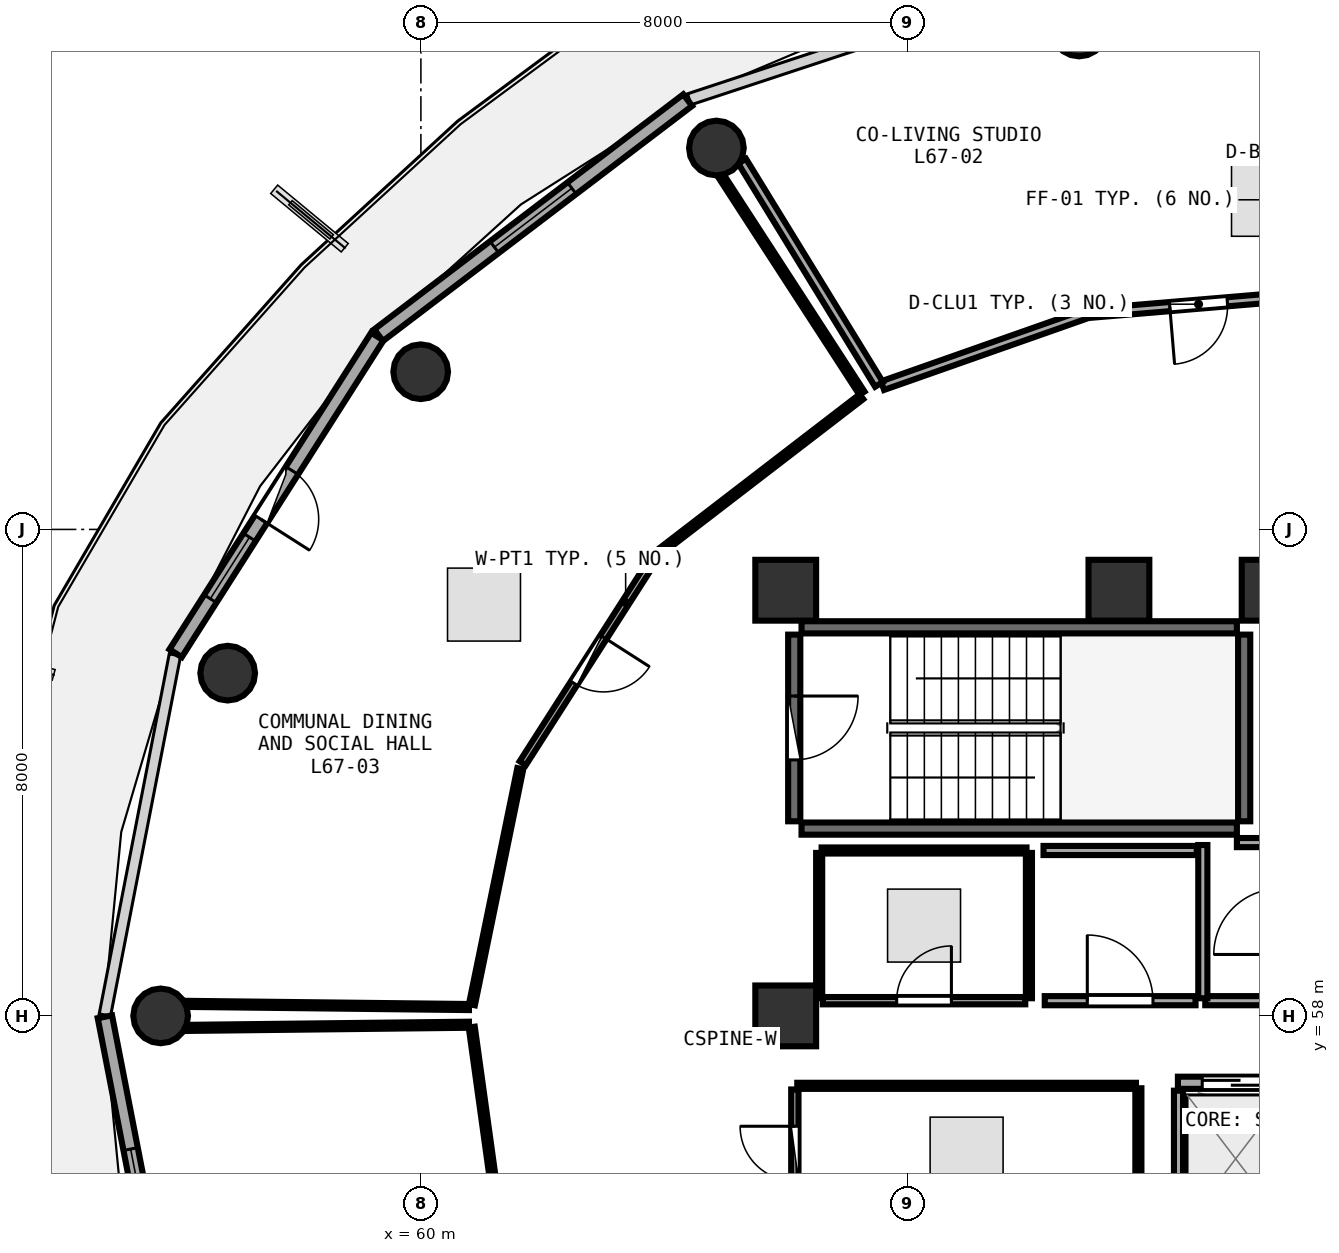
"""IFC4 building model, lengths in metres.
Left out: names, types, materials, properties, quantities, classifications, styles, units other than length and angle.
Written with IfcOpenShell. Run it as: python <this file> out.ifc"""

import sys

from ifc_helpers import new_model, si_unit, direction, frame, frame_2d, origin, origin_2d, place, context, subcontext, project, spatial, rectangle, circle, extrude, element, fill, save


model = new_model("IFC4")
c1 = context("Model", 3, precision=1e-05, world=origin(), true_north=direction((0.0, 1.0)))
c2 = subcontext(c1, "Body", "Model", "MODEL_VIEW")
j1 = project(units=[si_unit("LENGTHUNIT", "METRE"), si_unit("PLANEANGLEUNIT", "RADIAN")], contexts=[c1])
p1 = place(None, origin())
s1 = spatial("IfcSite", under=j1, at=p1, CompositionType="ELEMENT")
p2 = place(p1, origin())
s2 = spatial("IfcBuilding", under=s1, at=p2, CompositionType="ELEMENT")
p3 = place(p2, frame((0.0, 0.0, 263.7)))
s3 = spatial("IfcBuildingStorey", under=s2, at=p3, CompositionType="ELEMENT", Elevation=263.7)
for number, where, z_axis, x_axis in (
    (1, (74.0, 65.0, 0.0), (0.0, 0.0, 1.0), (1.0, 0.0, 0.0)),
    (2, (71.48, 65.0, 0.0), (0.0, 0.0, 1.0), (1.0, 0.0, 0.0)),
    (3, (66.0, 65.0, 0.0), (0.0, 0.0, 1.0), (1.0, 0.0, 0.0)),
    (4, (66.0, 58.0, 0.0), (0.0, 0.0, 1.0), (1.0, 0.0, 0.0)),
):
    element("IfcColumn", number, at=place(p3, frame(where, z_axis=z_axis, x_axis=x_axis)), inside=s3, PredefinedType="PILASTER", context=c2, shape_type="SweptSolid", body=[
        extrude(rectangle(XDim=1.0, YDim=1.0, at=origin_2d()), origin(), (0.0, 0.0, 1.0), 3.75),
    ])
for number, where, z_axis, x_axis in (
    (5, (70.826, 74.229, 0.0), (0.0, 0.0, 1.0), (1.0, 0.0, 0.0)),
    (6, (64.86, 72.272, 0.0), (0.0, 0.0, 1.0), (1.0, 0.0, 0.0)),
    (7, (59.997, 68.593, 0.0), (0.0, 0.0, 1.0), (1.0, 0.0, 0.0)),
    (8, (56.823, 63.636, 0.0), (0.0, 0.0, 1.0), (1.0, 0.0, 0.0)),
    (9, (55.72, 58.0, 0.0), (0.0, 0.0, 1.0), (1.0, 0.0, 0.0)),
):
    element("IfcColumn", number, at=place(p3, frame(where, z_axis=z_axis, x_axis=x_axis)), inside=s3, PredefinedType="COLUMN", context=c2, shape_type="SweptSolid", body=[
        extrude(circle(Radius=0.45, at=origin_2d()), origin(), (0.0, 0.0, 1.0), 3.75),
    ])
p4 = place(p3, frame((64.388, 73.06, 0.0), z_axis=(0.0, 0.0, 1.0), x_axis=(-0.796010444211, -0.605282886514, 0.0)))
e10 = element("IfcWall", 10, at=p4, inside=s3, PredefinedType="SOLIDWALL", context=c2, shape_type="SweptSolid", body=[
    extrude(rectangle(XDim=6.387, YDim=0.24, at=frame_2d((3.194, 0.0))), origin(), (0.0, 0.0, 1.0), 3.475),
])
p5 = place(p4, frame((2.394, 0.0, 0.85)))
e11 = element("IfcOpeningElement", 11, at=p5, cuts=e10, PredefinedType="OPENING", context=c2, shape_type="SweptSolid", body=[
    extrude(rectangle(XDim=1.6, YDim=1.45, at=frame_2d((0.8, 0.725))), frame((0.0, 0.13, 0.0), z_axis=(0.0, -1.0, 0.0), x_axis=(1.0, 0.0, 0.0)), (0.0, 0.0, 1.0), 0.26),
])
p6 = place(p3, frame((59.284, 69.172, 0.0), z_axis=(0.0, 0.0, 1.0), x_axis=(-0.537271968456, -0.843409053728, 0.0)))
e12 = element("IfcWall", 12, at=p6, inside=s3, PredefinedType="SOLIDWALL", context=c2, shape_type="SweptSolid", body=[
    extrude(rectangle(XDim=6.175, YDim=0.24, at=frame_2d((3.087, 0.0))), origin(), (0.0, 0.0, 1.0), 3.475),
])
p7 = place(p6, frame((2.613, 0.0, 0.0)))
e13 = element("IfcOpeningElement", 13, at=p7, cuts=e12, PredefinedType="OPENING", context=c2, shape_type="SweptSolid", body=[
    extrude(rectangle(XDim=0.95, YDim=2.1, at=frame_2d((0.475, 1.05))), frame((0.0, 0.13, 0.0), z_axis=(0.0, -1.0, 0.0), x_axis=(1.0, 0.0, 0.0)), (0.0, 0.0, 1.0), 0.26),
])
p8 = place(p6, frame((3.913, 0.0, 0.85)))
e14 = element("IfcOpeningElement", 14, at=p8, cuts=e12, PredefinedType="OPENING", context=c2, shape_type="SweptSolid", body=[
    extrude(rectangle(XDim=1.2, YDim=1.45, at=frame_2d((0.6, 0.725))), frame((0.0, 0.13, 0.0), z_axis=(0.0, -1.0, 0.0), x_axis=(1.0, 0.0, 0.0)), (0.0, 0.0, 1.0), 0.26),
])
p9 = place(p3, frame((54.803, 57.985, 0.0), z_axis=(0.0, 0.0, 1.0), x_axis=(0.190969309115, -0.981596008028, 0.0)))
e15 = element("IfcWall", 15, at=p9, inside=s3, PredefinedType="SOLIDWALL", context=c2, shape_type="SweptSolid", body=[
    extrude(rectangle(XDim=6.033, YDim=0.24, at=frame_2d((3.017, 0.0))), origin(), (0.0, 0.0, 1.0), 3.475),
])
p10 = place(p9, frame((2.216, 0.0, 0.85)))
e16 = element("IfcOpeningElement", 16, at=p10, cuts=e15, PredefinedType="OPENING", context=c2, shape_type="SweptSolid", body=[
    extrude(rectangle(XDim=1.6, YDim=1.45, at=frame_2d((0.8, 0.725))), frame((0.0, 0.13, 0.0), z_axis=(0.0, -1.0, 0.0), x_axis=(1.0, 0.0, 0.0)), (0.0, 0.0, 1.0), 0.26),
])
p11 = place(p3, frame((66.26, 61.08, 0.0), z_axis=(0.0, 0.0, 1.0), x_axis=(1.0, 0.0, 0.0)))
e17 = element("IfcWall", 17, at=p11, inside=s3, PredefinedType="SHEAR", context=c2, shape_type="SweptSolid", body=[
    extrude(rectangle(XDim=7.16, YDim=0.2, at=frame_2d((3.58, 0.0))), origin(), (0.0, 0.0, 1.0), 3.49),
])
p12 = place(p3, frame((73.54, 61.2, 0.0), z_axis=(0.0, 0.0, 1.0), x_axis=(0.0, 1.0, 0.0)))
e18 = element("IfcWall", 18, at=p12, inside=s3, PredefinedType="SHEAR", context=c2, shape_type="SweptSolid", body=[
    extrude(rectangle(XDim=3.07, YDim=0.2, at=frame_2d((1.535, 0.0))), origin(), (0.0, 0.0, 1.0), 3.49),
])
p13 = place(p3, frame((73.42, 64.39, 0.0), z_axis=(0.0, 0.0, 1.0), x_axis=(-1.0, 0.0, 0.0)))
e19 = element("IfcWall", 19, at=p13, inside=s3, PredefinedType="SHEAR", context=c2, shape_type="SweptSolid", body=[
    extrude(rectangle(XDim=7.16, YDim=0.2, at=frame_2d((3.58, 0.0))), origin(), (0.0, 0.0, 1.0), 3.49),
])
p14 = place(p3, frame((66.14, 64.27, 0.0), z_axis=(0.0, 0.0, 1.0), x_axis=(0.0, -1.0, 0.0)))
e20 = element("IfcWall", 20, at=p14, inside=s3, PredefinedType="SHEAR", context=c2, shape_type="SweptSolid", body=[
    extrude(rectangle(XDim=3.07, YDim=0.2, at=frame_2d((1.535, 0.0))), origin(), (0.0, 0.0, 1.0), 3.49),
])
p15 = place(p14, frame((1.01, 0.0, 0.0)))
e21 = element("IfcOpeningElement", 21, at=p15, cuts=e20, PredefinedType="OPENING", context=c2, shape_type="SweptSolid", body=[
    extrude(rectangle(XDim=1.05, YDim=2.1, at=frame_2d((0.525, 1.05))), frame((0.0, 0.11, 0.0), z_axis=(0.0, -1.0, 0.0), x_axis=(1.0, 0.0, 0.0)), (0.0, 0.0, 1.0), 0.22),
])
p16 = place(p3, frame((72.45, 56.9, 0.0), z_axis=(0.0, 0.0, 1.0), x_axis=(1.0, 0.0, 0.0)))
e22 = element("IfcWall", 22, at=p16, inside=s3, PredefinedType="SOLIDWALL", context=c2, shape_type="SweptSolid", body=[
    extrude(rectangle(XDim=8.4, YDim=0.2, at=frame_2d((4.2, 0.0))), origin(), (0.0, 0.0, 1.0), 3.48),
])
p17 = place(p16, frame((0.4, 0.0, 0.0)))
e23 = element("IfcOpeningElement", 23, at=p17, cuts=e22, PredefinedType="OPENING", context=c2, shape_type="SweptSolid", body=[
    extrude(rectangle(XDim=1.1, YDim=2.1, at=frame_2d((0.55, 1.05))), frame((0.0, 0.11, 0.0), z_axis=(0.0, -1.0, 0.0), x_axis=(1.0, 0.0, 0.0)), (0.0, 0.0, 1.0), 0.22),
])
p18 = place(p16, frame((2.4, 0.0, 0.0)))
e24 = element("IfcOpeningElement", 24, at=p18, cuts=e22, PredefinedType="OPENING", context=c2, shape_type="SweptSolid", body=[
    extrude(rectangle(XDim=1.1, YDim=2.1, at=frame_2d((0.55, 1.05))), frame((0.0, 0.11, 0.0), z_axis=(0.0, -1.0, 0.0), x_axis=(1.0, 0.0, 0.0)), (0.0, 0.0, 1.0), 0.22),
])
p19 = place(p3, frame((72.46, 54.48, 0.0), z_axis=(0.0, 0.0, 1.0), x_axis=(0.0, 1.0, 0.0)))
e25 = element("IfcWall", 25, at=p19, inside=s3, PredefinedType="PARTITIONING", context=c2, shape_type="SweptSolid", body=[
    extrude(rectangle(XDim=2.29, YDim=0.15, at=frame_2d((1.145, 0.0))), origin(), (0.0, 0.0, 1.0), 3.48),
])
p20 = place(p3, frame((66.61, 58.25, 0.0), z_axis=(0.0, 0.0, 1.0), x_axis=(1.0, 0.0, 0.0)))
e26 = element("IfcWall", 26, at=p20, inside=s3, PredefinedType="PARTITIONING", context=c2, shape_type="SweptSolid", body=[
    extrude(rectangle(XDim=3.33, YDim=0.12, at=frame_2d((1.665, 0.0))), origin(), (0.0, 0.0, 1.0), 3.48),
])
p21 = place(p20, frame((1.215, 0.0, 0.0)))
e27 = element("IfcOpeningElement", 27, at=p21, cuts=e26, PredefinedType="OPENING", context=c2, shape_type="SweptSolid", body=[
    extrude(rectangle(XDim=0.9, YDim=2.08, at=frame_2d((0.45, 1.04))), frame((0.0, 0.07, 0.0), z_axis=(0.0, -1.0, 0.0), x_axis=(1.0, 0.0, 0.0)), (0.0, 0.0, 1.0), 0.14),
])
p22 = place(p3, frame((70.26, 58.25, 0.0), z_axis=(0.0, 0.0, 1.0), x_axis=(1.0, 0.0, 0.0)))
e28 = element("IfcWall", 28, at=p22, inside=s3, PredefinedType="PARTITIONING", context=c2, shape_type="SweptSolid", body=[
    extrude(rectangle(XDim=2.48, YDim=0.15, at=frame_2d((1.24, 0.0))), origin(), (0.0, 0.0, 1.0), 3.48),
])
p23 = place(p22, frame((0.7, 0.0, 0.0)))
e29 = element("IfcOpeningElement", 29, at=p23, cuts=e28, PredefinedType="OPENING", context=c2, shape_type="SweptSolid", body=[
    extrude(rectangle(XDim=1.08, YDim=2.1, at=frame_2d((0.54, 1.05))), frame((0.0, 0.085, 0.0), z_axis=(0.0, -1.0, 0.0), x_axis=(1.0, 0.0, 0.0)), (0.0, 0.0, 1.0), 0.17),
])
p24 = place(p3, frame((66.15, 54.68, 0.0), z_axis=(0.0, 0.0, 1.0), x_axis=(0.0, 1.0, 0.0)))
e30 = element("IfcWall", 30, at=p24, inside=s3, PredefinedType="PARTITIONING", context=c2, shape_type="SweptSolid", body=[
    extrude(rectangle(XDim=2.11, YDim=0.12, at=frame_2d((1.055, 0.0))), origin(), (0.0, 0.0, 1.0), 2.775),
])
p25 = place(p24, frame((0.605, 0.0, 0.0)))
e31 = element("IfcOpeningElement", 31, at=p25, cuts=e30, PredefinedType="OPENING", context=c2, shape_type="SweptSolid", body=[
    extrude(rectangle(XDim=0.9, YDim=2.08, at=frame_2d((0.45, 1.04))), frame((0.0, 0.07, 0.0), z_axis=(0.0, -1.0, 0.0), x_axis=(1.0, 0.0, 0.0)), (0.0, 0.0, 1.0), 0.14),
])
p26 = place(p3, frame((74.553, 69.852, 0.0), z_axis=(0.0, 0.0, 1.0), x_axis=(-0.996494196011, -0.083661922741, 0.0)))
e32 = element("IfcWall", 32, at=p26, inside=s3, PredefinedType="PARTITIONING", context=c2, shape_type="SweptSolid", body=[
    extrude(rectangle(XDim=3.54, YDim=0.15, at=frame_2d((1.77, 0.0))), origin(), (0.0, 0.0, 1.0), 3.075),
])
p27 = place(p26, frame((1.295, 0.0, 0.0)))
e33 = element("IfcOpeningElement", 33, at=p27, cuts=e32, PredefinedType="OPENING", context=c2, shape_type="SweptSolid", body=[
    extrude(rectangle(XDim=0.95, YDim=2.08, at=frame_2d((0.475, 1.04))), frame((0.0, 0.085, 0.0), z_axis=(0.0, -1.0, 0.0), x_axis=(1.0, 0.0, 0.0)), (0.0, 0.0, 1.0), 0.17),
])
p28 = place(p3, frame((63.844, 65.542, 0.0), z_axis=(0.0, 0.0, 1.0), x_axis=(-0.539324099435, -0.842098281538, 0.0)))
e34 = element("IfcWall", 34, at=p28, inside=s3, PredefinedType="PARTITIONING", context=c2, shape_type="SweptSolid", body=[
    extrude(rectangle(XDim=4.022, YDim=0.12, at=frame_2d((2.011, 0.0))), origin(), (0.0, 0.0, 1.0), 3.075),
])
p29 = place(p28, frame((1.561, 0.0, 0.0)))
e35 = element("IfcOpeningElement", 35, at=p29, cuts=e34, PredefinedType="OPENING", context=c2, shape_type="SweptSolid", body=[
    extrude(rectangle(XDim=0.9, YDim=2.08, at=frame_2d((0.45, 1.04))), frame((0.0, 0.07, 0.0), z_axis=(0.0, -1.0, 0.0), x_axis=(1.0, 0.0, 0.0)), (0.0, 0.0, 1.0), 0.14),
])
p30 = place(p3, frame((72.9, 58.25, 0.0), z_axis=(0.0, 0.0, 1.0), x_axis=(1.0, 0.0, 0.0)))
e36 = element("IfcWall", 36, at=p30, inside=s3, PredefinedType="PARTITIONING", context=c2, shape_type="SweptSolid", body=[
    extrude(rectangle(XDim=1.18, YDim=0.15, at=frame_2d((0.59, 0.0))), origin(), (0.0, 0.0, 1.0), 3.48),
])
p31 = place(p3, frame((74.08, 60.85, 0.0), z_axis=(0.0, 0.0, 1.0), x_axis=(-1.0, 0.0, 0.0)))
e37 = element("IfcWall", 37, at=p31, inside=s3, PredefinedType="PARTITIONING", context=c2, shape_type="SweptSolid", body=[
    extrude(rectangle(XDim=0.66, YDim=0.15, at=frame_2d((0.33, 0.0))), origin(), (0.0, 0.0, 1.0), 3.48),
])
p32 = place(p3, frame((72.86, 60.81, 0.0), z_axis=(0.0, 0.0, 1.0), x_axis=(0.0, -1.0, 0.0)))
e38 = element("IfcWall", 38, at=p32, inside=s3, PredefinedType="PARTITIONING", context=c2, shape_type="SweptSolid", body=[
    extrude(rectangle(XDim=2.52, YDim=0.15, at=frame_2d((1.26, 0.0))), origin(), (0.0, 0.0, 1.0), 3.48),
])
p33 = place(p3, frame((70.0, 58.29, 0.0), z_axis=(0.0, 0.0, 1.0), x_axis=(0.0, 1.0, 0.0)))
e39 = element("IfcWall", 39, at=p33, inside=s3, PredefinedType="PARTITIONING", context=c2, shape_type="SweptSolid", body=[
    extrude(rectangle(XDim=2.39, YDim=0.1, at=frame_2d((1.195, 0.0))), origin(), (0.0, 0.0, 1.0), 3.48),
])
p34 = place(p3, frame((69.96, 60.72, 0.0), z_axis=(0.0, 0.0, 1.0), x_axis=(-1.0, 0.0, 0.0)))
e40 = element("IfcWall", 40, at=p34, inside=s3, PredefinedType="PARTITIONING", context=c2, shape_type="SweptSolid", body=[
    extrude(rectangle(XDim=3.37, YDim=0.1, at=frame_2d((1.685, 0.0))), origin(), (0.0, 0.0, 1.0), 3.48),
])
p35 = place(p3, frame((66.55, 60.68, 0.0), z_axis=(0.0, 0.0, 1.0), x_axis=(0.0, -1.0, 0.0)))
e41 = element("IfcWall", 41, at=p35, inside=s3, PredefinedType="PARTITIONING", context=c2, shape_type="SweptSolid", body=[
    extrude(rectangle(XDim=2.39, YDim=0.1, at=frame_2d((1.195, 0.0))), origin(), (0.0, 0.0, 1.0), 3.48),
])
p36 = place(p3, frame((72.76, 60.72, 0.0), z_axis=(0.0, 0.0, 1.0), x_axis=(-1.0, 0.0, 0.0)))
e42 = element("IfcWall", 42, at=p36, inside=s3, PredefinedType="PARTITIONING", context=c2, shape_type="SweptSolid", body=[
    extrude(rectangle(XDim=2.52, YDim=0.15, at=frame_2d((1.26, 0.0))), origin(), (0.0, 0.0, 1.0), 3.48),
])
p37 = place(p3, frame((71.8, 54.66, 0.0), z_axis=(0.0, 0.0, 1.0), x_axis=(0.0, 1.0, 0.0)))
e43 = element("IfcWall", 43, at=p37, inside=s3, PredefinedType="PARTITIONING", context=c2, shape_type="SweptSolid", body=[
    extrude(rectangle(XDim=2.15, YDim=0.1, at=frame_2d((1.075, 0.0))), origin(), (0.0, 0.0, 1.0), 3.48),
])
p38 = place(p3, frame((71.76, 56.85, 0.0), z_axis=(0.0, 0.0, 1.0), x_axis=(-1.0, 0.0, 0.0)))
e44 = element("IfcWall", 44, at=p38, inside=s3, PredefinedType="PARTITIONING", context=c2, shape_type="SweptSolid", body=[
    extrude(rectangle(XDim=5.57, YDim=0.1, at=frame_2d((2.785, 0.0))), origin(), (0.0, 0.0, 1.0), 2.775),
])
p39 = place(p3, frame((70.928, 69.538, 0.0), z_axis=(0.0, 0.0, 1.0), x_axis=(-0.943334007166, -0.331844769319, 0.0)))
e45 = element("IfcWall", 45, at=p39, inside=s3, PredefinedType="PARTITIONING", context=c2, shape_type="SweptSolid", body=[
    extrude(rectangle(XDim=3.536, YDim=0.15, at=frame_2d((1.768, 0.0))), origin(), (0.0, 0.0, 1.0), 3.48),
])
p40 = place(p3, frame((67.534, 68.385, 0.0), z_axis=(0.0, 0.0, 1.0), x_axis=(-0.522784059663, 0.852465147066, 0.0)))
e46 = element("IfcWall", 46, at=p40, inside=s3, PredefinedType="PARTITIONING", context=c2, shape_type="SweptSolid", body=[
    extrude(rectangle(XDim=4.306, YDim=0.15, at=frame_2d((2.153, 0.0))), origin(), (0.0, 0.0, 1.0), 3.175),
])
p41 = place(p3, frame((67.244, 68.182, 0.0), z_axis=(0.0, 0.0, 1.0), x_axis=(-0.792820246885, -0.609455540733, 0.0)))
e47 = element("IfcWall", 47, at=p41, inside=s3, PredefinedType="PARTITIONING", context=c2, shape_type="SweptSolid", body=[
    extrude(rectangle(XDim=4.207, YDim=0.1, at=frame_2d((2.104, 0.0))), origin(), (0.0, 0.0, 1.0), 3.075),
])
p42 = place(p3, frame((61.635, 62.066, 0.0), z_axis=(0.0, 0.0, 1.0), x_axis=(-0.200853183429, -0.979621354762, 0.0)))
e48 = element("IfcWall", 48, at=p42, inside=s3, PredefinedType="PARTITIONING", context=c2, shape_type="SweptSolid", body=[
    extrude(rectangle(XDim=3.963, YDim=0.1, at=frame_2d((1.981, 0.0))), origin(), (0.0, 0.0, 1.0), 3.48),
])
p43 = place(p3, frame((60.791, 58.146, 0.0), z_axis=(0.0, 0.0, 1.0), x_axis=(-0.999937174585, 0.01120923205, 0.0)))
e49 = element("IfcWall", 49, at=p43, inside=s3, PredefinedType="PARTITIONING", context=c2, shape_type="SweptSolid", body=[
    extrude(rectangle(XDim=4.639, YDim=0.1, at=frame_2d((2.32, 0.0))), origin(), (0.0, 0.0, 1.0), 3.075),
])
p44 = place(p3, frame((64.942, 71.804, 0.0), z_axis=(0.0, 0.0, 1.0), x_axis=(0.544234825024, -0.838932926539, 0.0)))
e50 = element("IfcWall", 50, at=p44, inside=s3, PredefinedType="PARTITIONING", context=c2, shape_type="SweptSolid", body=[
    extrude(rectangle(XDim=4.249, YDim=0.1, at=frame_2d((2.125, 0.0))), origin(), (0.0, 0.0, 1.0), 3.075),
])
p45 = place(p3, frame((60.836, 57.815, 0.0), z_axis=(0.0, 0.0, 1.0), x_axis=(0.137359832701, -0.990521214493, 0.0)))
e51 = element("IfcWall", 51, at=p45, inside=s3, PredefinedType="PARTITIONING", context=c2, shape_type="SweptSolid", body=[
    extrude(rectangle(XDim=2.584, YDim=0.1, at=frame_2d((1.292, 0.0))), origin(), (0.0, 0.0, 1.0), 3.48),
])
p46 = place(p3, frame((56.152, 57.802, 0.0), z_axis=(0.0, 0.0, 1.0), x_axis=(0.999937174585, 0.01120923205, 0.0)))
e52 = element("IfcWall", 52, at=p46, inside=s3, PredefinedType="PARTITIONING", context=c2, shape_type="SweptSolid", body=[
    extrude(rectangle(XDim=4.639, YDim=0.1, at=frame_2d((2.32, 0.0))), origin(), (0.0, 0.0, 1.0), 3.075),
])
p47 = place(p5, origin())
e53 = element("IfcWindow", 53, at=p47, inside=s3, PartitioningType="SINGLE_PANEL", PredefinedType="WINDOW", context=c2, shape_type="SweptSolid", body=[
    extrude(rectangle(XDim=1.6, YDim=1.45, at=frame_2d((0.8, 0.725))), frame((0.0, 0.03, 0.0), z_axis=(0.0, -1.0, 0.0), x_axis=(1.0, 0.0, 0.0)), (0.0, 0.0, 1.0), 0.06),
])
fill(e11, e53)
p48 = place(p7, frame((0.95, 0.0, 0.0), z_axis=(0.0, 0.0, 1.0), x_axis=(-1.0, 0.0, 0.0)))
e54 = element("IfcDoor", 54, at=p48, inside=s3, OperationType="SINGLE_SWING_LEFT", PredefinedType="DOOR", context=c2, shape_type="SweptSolid", body=[
    extrude(rectangle(XDim=0.95, YDim=2.1, at=frame_2d((0.475, 1.05))), frame((0.0, 0.025, 0.0), z_axis=(0.0, -1.0, 0.0), x_axis=(1.0, 0.0, 0.0)), (0.0, 0.0, 1.0), 0.05),
])
fill(e13, e54)
p49 = place(p8, origin())
e55 = element("IfcWindow", 55, at=p49, inside=s3, PartitioningType="SINGLE_PANEL", PredefinedType="WINDOW", context=c2, shape_type="SweptSolid", body=[
    extrude(rectangle(XDim=1.2, YDim=1.45, at=frame_2d((0.6, 0.725))), frame((0.0, 0.03, 0.0), z_axis=(0.0, -1.0, 0.0), x_axis=(1.0, 0.0, 0.0)), (0.0, 0.0, 1.0), 0.06),
])
fill(e14, e55)
p50 = place(p10, origin())
e56 = element("IfcWindow", 56, at=p50, inside=s3, PartitioningType="SINGLE_PANEL", PredefinedType="WINDOW", context=c2, shape_type="SweptSolid", body=[
    extrude(rectangle(XDim=1.6, YDim=1.45, at=frame_2d((0.8, 0.725))), frame((0.0, 0.03, 0.0), z_axis=(0.0, -1.0, 0.0), x_axis=(1.0, 0.0, 0.0)), (0.0, 0.0, 1.0), 0.06),
])
fill(e16, e56)
p51 = place(p15, origin())
e57 = element("IfcDoor", 57, at=p51, inside=s3, OperationType="SINGLE_SWING_LEFT", PredefinedType="DOOR", context=c2, shape_type="SweptSolid", body=[
    extrude(rectangle(XDim=1.05, YDim=2.1, at=frame_2d((0.525, 1.05))), frame((0.0, 0.025, 0.0), z_axis=(0.0, -1.0, 0.0), x_axis=(1.0, 0.0, 0.0)), (0.0, 0.0, 1.0), 0.05),
])
fill(e21, e57)
p52 = place(p17, origin())
e58 = element("IfcDoor", 58, at=p52, inside=s3, OperationType="DOUBLE_DOOR_SLIDING", PredefinedType="DOOR", context=c2, shape_type="SweptSolid", body=[
    extrude(rectangle(XDim=1.1, YDim=2.1, at=frame_2d((0.55, 1.05))), frame((0.0, 0.025, 0.0), z_axis=(0.0, -1.0, 0.0), x_axis=(1.0, 0.0, 0.0)), (0.0, 0.0, 1.0), 0.05),
])
fill(e23, e58)
p53 = place(p21, origin())
e59 = element("IfcDoor", 59, at=p53, inside=s3, OperationType="SINGLE_SWING_RIGHT", PredefinedType="DOOR", context=c2, shape_type="SweptSolid", body=[
    extrude(rectangle(XDim=0.9, YDim=2.08, at=frame_2d((0.45, 1.04))), frame((0.0, 0.025, 0.0), z_axis=(0.0, -1.0, 0.0), x_axis=(1.0, 0.0, 0.0)), (0.0, 0.0, 1.0), 0.05),
])
fill(e27, e59)
p54 = place(p23, origin())
e60 = element("IfcDoor", 60, at=p54, inside=s3, OperationType="SINGLE_SWING_LEFT", PredefinedType="DOOR", context=c2, shape_type="SweptSolid", body=[
    extrude(rectangle(XDim=1.08, YDim=2.1, at=frame_2d((0.54, 1.05))), frame((0.0, 0.025, 0.0), z_axis=(0.0, -1.0, 0.0), x_axis=(1.0, 0.0, 0.0)), (0.0, 0.0, 1.0), 0.05),
])
fill(e29, e60)
p55 = place(p25, origin())
e61 = element("IfcDoor", 61, at=p55, inside=s3, OperationType="SINGLE_SWING_RIGHT", PredefinedType="DOOR", context=c2, shape_type="SweptSolid", body=[
    extrude(rectangle(XDim=0.9, YDim=2.08, at=frame_2d((0.45, 1.04))), frame((0.0, 0.025, 0.0), z_axis=(0.0, -1.0, 0.0), x_axis=(1.0, 0.0, 0.0)), (0.0, 0.0, 1.0), 0.05),
])
fill(e31, e61)
p56 = place(p27, origin())
e62 = element("IfcDoor", 62, at=p56, inside=s3, OperationType="SINGLE_SWING_RIGHT", PredefinedType="DOOR", context=c2, shape_type="SweptSolid", body=[
    extrude(rectangle(XDim=0.95, YDim=2.08, at=frame_2d((0.475, 1.04))), frame((0.0, 0.025, 0.0), z_axis=(0.0, -1.0, 0.0), x_axis=(1.0, 0.0, 0.0)), (0.0, 0.0, 1.0), 0.05),
])
fill(e33, e62)
p57 = place(p29, origin())
e63 = element("IfcDoor", 63, at=p57, inside=s3, OperationType="SINGLE_SWING_LEFT", PredefinedType="DOOR", context=c2, shape_type="SweptSolid", body=[
    extrude(rectangle(XDim=0.9, YDim=2.08, at=frame_2d((0.45, 1.04))), frame((0.0, 0.025, 0.0), z_axis=(0.0, -1.0, 0.0), x_axis=(1.0, 0.0, 0.0)), (0.0, 0.0, 1.0), 0.05),
])
fill(e35, e63)
save(model, sys.argv[1])
